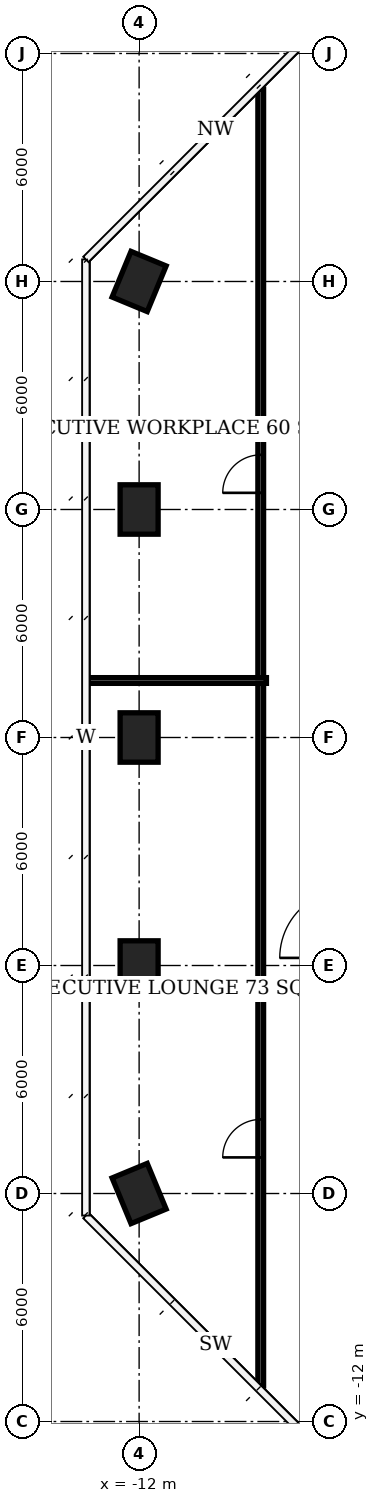
"""IFC4 building model, lengths in metres.
Left out: names, types, materials, properties, quantities, classifications, styles, units other than length and angle.
Written with IfcOpenShell. Run it as: python <this file> out.ifc"""

import sys

from ifc_helpers import new_model, si_unit, direction, frame, frame_2d, origin, origin_2d, place, context, subcontext, project, spatial, rectangle, extrude, element, fill, save


model = new_model("IFC4")
c1 = context("Model", 3, precision=1e-05, world=origin(), true_north=direction((0.0, 1.0)))
c2 = subcontext(c1, "Body", "Model", "MODEL_VIEW")
j1 = project(units=[si_unit("LENGTHUNIT", "METRE"), si_unit("PLANEANGLEUNIT", "RADIAN")], contexts=[c1])
p1 = place(None, origin())
s1 = spatial("IfcSite", under=j1, at=p1, CompositionType="ELEMENT")
p2 = place(p1, origin())
s2 = spatial("IfcBuilding", under=s1, at=p2, CompositionType="ELEMENT")
p3 = place(p2, frame((0.0, 0.0, 260.6)))
s3 = spatial("IfcBuildingStorey", under=s2, at=p3, CompositionType="ELEMENT", Elevation=260.6)
for number, where, z_axis, x_axis in (
    (1, (-12.0, -6.0, 0.0), (0.0, 0.0, 1.0), (-0.383, 0.924, 0.0)),
    (2, (-12.0, 0.0, 0.0), (0.0, 0.0, 1.0), (0.0, 1.0, 0.0)),
    (3, (-12.0, 6.0, 0.0), (0.0, 0.0, 1.0), (0.0, 1.0, 0.0)),
    (4, (-12.0, 12.0, 0.0), (0.0, 0.0, 1.0), (0.0, 1.0, 0.0)),
    (5, (-12.0, 18.0, 0.0), (0.0, 0.0, 1.0), (0.383, 0.924, 0.0)),
):
    element("IfcColumn", number, at=place(p3, frame(where, z_axis=z_axis, x_axis=x_axis)), inside=s3, PredefinedType="COLUMN", context=c2, shape_type="SweptSolid", body=[
        extrude(rectangle(XDim=1.3, YDim=1.0, at=origin_2d()), origin(), (0.0, 0.0, 1.0), 3.9),
    ])
p4 = place(p3, frame((-13.375, 7.5, 0.0), z_axis=(0.0, 0.0, 1.0), x_axis=(1.0, 0.0, 0.0)))
e6 = element("IfcWall", 6, at=p4, inside=s3, PredefinedType="PARTITIONING", context=c2, shape_type="SweptSolid", body=[
    extrude(rectangle(XDim=4.725, YDim=0.15, at=frame_2d((2.363, 0.0))), origin(), (0.0, 0.0, 1.0), 3.65),
])
p5 = place(p3, frame((-8.8, -11.063, 0.0), z_axis=(0.0, 0.0, 1.0), x_axis=(0.0, 1.0, 0.0)))
e7 = element("IfcWall", 7, at=p5, inside=s3, PredefinedType="PARTITIONING", context=c2, shape_type="SweptSolid", body=[
    extrude(rectangle(XDim=18.488, YDim=0.15, at=frame_2d((9.244, 0.0))), origin(), (0.0, 0.0, 1.0), 3.65),
])
p6 = place(p5, frame((6.013, 0.0, 0.0)))
e8 = element("IfcOpeningElement", 8, at=p6, cuts=e7, PredefinedType="OPENING", context=c2, shape_type="SweptSolid", body=[
    extrude(rectangle(XDim=1.0, YDim=2.4, at=frame_2d((0.5, 1.2))), frame((0.0, 0.085, 0.0), z_axis=(0.0, -1.0, 0.0), x_axis=(1.0, 0.0, 0.0)), (0.0, 0.0, 1.0), 0.17),
])
p7 = place(p3, frame((-8.8, 7.575, 0.0), z_axis=(0.0, 0.0, 1.0), x_axis=(0.0, 1.0, 0.0)))
e9 = element("IfcWall", 9, at=p7, inside=s3, PredefinedType="PARTITIONING", context=c2, shape_type="SweptSolid", body=[
    extrude(rectangle(XDim=15.488, YDim=0.15, at=frame_2d((7.744, 0.0))), origin(), (0.0, 0.0, 1.0), 3.65),
])
p8 = place(p7, frame((4.863, 0.0, 0.0)))
e10 = element("IfcOpeningElement", 10, at=p8, cuts=e9, PredefinedType="OPENING", context=c2, shape_type="SweptSolid", body=[
    extrude(rectangle(XDim=1.0, YDim=2.4, at=frame_2d((0.5, 1.2))), frame((0.0, 0.085, 0.0), z_axis=(0.0, -1.0, 0.0), x_axis=(1.0, 0.0, 0.0)), (0.0, 0.0, 1.0), 0.17),
])
p9 = place(p6, origin())
e11 = element("IfcDoor", 11, at=p9, inside=s3, OperationType="SINGLE_SWING_LEFT", PredefinedType="DOOR", context=c2, shape_type="SweptSolid", body=[
    extrude(rectangle(XDim=1.0, YDim=2.4, at=frame_2d((0.5, 1.2))), frame((0.0, 0.025, 0.0), z_axis=(0.0, -1.0, 0.0), x_axis=(1.0, 0.0, 0.0)), (0.0, 0.0, 1.0), 0.05),
])
fill(e8, e11)
p10 = place(p8, origin())
e12 = element("IfcDoor", 12, at=p10, inside=s3, OperationType="SINGLE_SWING_LEFT", PredefinedType="DOOR", context=c2, shape_type="SweptSolid", body=[
    extrude(rectangle(XDim=1.0, YDim=2.4, at=frame_2d((0.5, 1.2))), frame((0.0, 0.025, 0.0), z_axis=(0.0, -1.0, 0.0), x_axis=(1.0, 0.0, 0.0)), (0.0, 0.0, 1.0), 0.05),
])
fill(e10, e12)
save(model, sys.argv[1])
